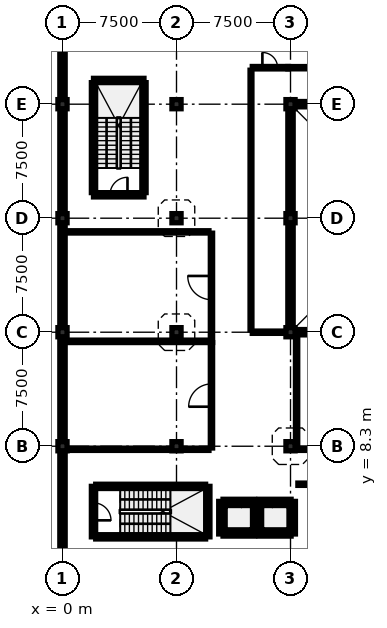
"""IFC4 building model, lengths in metres.
Left out: names, types, materials, properties, quantities, classifications, styles, units other than length and angle.
Written with IfcOpenShell. Run it as: python <this file> out.ifc"""

import sys

from ifc_helpers import new_model, si_unit, direction, frame, frame_2d, origin, origin_2d, place, context, subcontext, project, spatial, rectangle, extrude, element, fill, save


model = new_model("IFC4")
c1 = context("Model", 3, precision=1e-05, world=origin(), true_north=direction((0.0, 1.0)))
c2 = subcontext(c1, "Body", "Model", "MODEL_VIEW")
j1 = project(units=[si_unit("LENGTHUNIT", "METRE"), si_unit("PLANEANGLEUNIT", "RADIAN")], contexts=[c1])
p1 = place(None, origin())
s1 = spatial("IfcSite", under=j1, at=p1, CompositionType="ELEMENT")
p2 = place(p1, origin())
s2 = spatial("IfcBuilding", under=s1, at=p2, CompositionType="ELEMENT")
p3 = place(p2, frame((0.0, 0.0, 13.5)))
s3 = spatial("IfcBuildingStorey", under=s2, at=p3, CompositionType="ELEMENT", Elevation=13.5)
for number, where, z_axis, x_axis in (
    (1, (0.0, 8.3, 0.0), (0.0, 0.0, 1.0), (1.0, 0.0, 0.0)),
    (2, (0.0, 15.8, 0.0), (0.0, 0.0, 1.0), (1.0, 0.0, 0.0)),
    (3, (0.0, 23.3, 0.0), (0.0, 0.0, 1.0), (1.0, 0.0, 0.0)),
    (4, (0.0, 30.8, 0.0), (0.0, 0.0, 1.0), (1.0, 0.0, 0.0)),
    (5, (7.5, 8.3, 0.0), (0.0, 0.0, 1.0), (1.0, 0.0, 0.0)),
    (6, (7.5, 15.8, 0.0), (0.0, 0.0, 1.0), (1.0, 0.0, 0.0)),
    (7, (7.5, 23.3, 0.0), (0.0, 0.0, 1.0), (1.0, 0.0, 0.0)),
    (8, (7.5, 30.8, 0.0), (0.0, 0.0, 1.0), (1.0, 0.0, 0.0)),
    (9, (15.0, 8.3, 0.0), (0.0, 0.0, 1.0), (1.0, 0.0, 0.0)),
    (10, (15.0, 15.8, 0.0), (0.0, 0.0, 1.0), (1.0, 0.0, 0.0)),
    (11, (15.0, 23.3, 0.0), (0.0, 0.0, 1.0), (1.0, 0.0, 0.0)),
    (12, (15.0, 30.8, 0.0), (0.0, 0.0, 1.0), (1.0, 0.0, 0.0)),
):
    element("IfcColumn", number, at=place(p3, frame(where, z_axis=z_axis, x_axis=x_axis)), inside=s3, PredefinedType="COLUMN", context=c2, shape_type="SweptSolid", body=[
        extrude(rectangle(XDim=0.6, YDim=0.6, at=origin_2d()), origin(), (0.0, 0.0, 1.0), 3.72),
    ])
p4 = place(p3, frame((0.0, 1.1, 0.0), z_axis=(0.0, 0.0, 1.0), x_axis=(0.0, 1.0, 0.0)))
e13 = element("IfcWall", 13, at=p4, inside=s3, PredefinedType="SOLIDWALL", context=c2, shape_type="SweptSolid", body=[
    extrude(rectangle(XDim=6.9, YDim=0.35, at=frame_2d((3.45, 0.0))), origin(), (0.0, 0.0, 1.0), 3.005),
])
for number, where, z_axis, x_axis in (
    (14, (0.0, 8.6, 0.0), (0.0, 0.0, 1.0), (0.0, 1.0, 0.0)),
    (15, (0.0, 16.1, 0.0), (0.0, 0.0, 1.0), (0.0, 1.0, 0.0)),
    (16, (0.0, 23.6, 0.0), (0.0, 0.0, 1.0), (0.0, 1.0, 0.0)),
    (17, (0.0, 31.1, 0.0), (0.0, 0.0, 1.0), (0.0, 1.0, 0.0)),
    (18, (15.3, 15.8, 0.0), (0.0, 0.0, 1.0), (1.0, 0.0, 0.0)),
    (19, (22.2, 30.8, 0.0), (0.0, 0.0, 1.0), (-1.0, 0.0, 0.0)),
    (20, (15.0, 30.5, 0.0), (0.0, 0.0, 1.0), (0.0, -1.0, 0.0)),
    (21, (15.0, 23.0, 0.0), (0.0, 0.0, 1.0), (0.0, -1.0, 0.0)),
):
    element("IfcWall", number, at=place(p3, frame(where, z_axis=z_axis, x_axis=x_axis)), inside=s3, PredefinedType="SOLIDWALL", context=c2, shape_type="SweptSolid", body=[
        extrude(rectangle(XDim=6.9, YDim=0.35, at=frame_2d((3.45, 0.0))), origin(), (0.0, 0.0, 1.0), 2.805),
    ])
p5 = place(p3, frame((2.185, 2.34, 0.0), z_axis=(0.0, 0.0, 1.0), x_axis=(1.0, 0.0, 0.0)))
e22 = element("IfcWall", 22, at=p5, inside=s3, PredefinedType="SHEAR", context=c2, shape_type="SweptSolid", body=[
    extrude(rectangle(XDim=7.23, YDim=0.28, at=frame_2d((3.615, 0.0))), origin(), (0.0, 0.0, 1.0), 3.72),
])
p6 = place(p3, frame((9.56, 2.34, 0.0), z_axis=(0.0, 0.0, 1.0), x_axis=(0.0, 1.0, 0.0)))
e23 = element("IfcWall", 23, at=p6, inside=s3, PredefinedType="SHEAR", context=c2, shape_type="SweptSolid", body=[
    extrude(rectangle(XDim=3.32, YDim=0.28, at=frame_2d((1.66, 0.0))), origin(), (0.0, 0.0, 1.0), 3.72),
])
p7 = place(p3, frame((9.415, 5.66, 0.0), z_axis=(0.0, 0.0, 1.0), x_axis=(-1.0, 0.0, 0.0)))
e24 = element("IfcWall", 24, at=p7, inside=s3, PredefinedType="SHEAR", context=c2, shape_type="SweptSolid", body=[
    extrude(rectangle(XDim=7.23, YDim=0.28, at=frame_2d((3.615, 0.0))), origin(), (0.0, 0.0, 1.0), 3.72),
])
p8 = place(p3, frame((2.04, 5.66, 0.0), z_axis=(0.0, 0.0, 1.0), x_axis=(0.0, -1.0, 0.0)))
e25 = element("IfcWall", 25, at=p8, inside=s3, PredefinedType="SHEAR", context=c2, shape_type="SweptSolid", body=[
    extrude(rectangle(XDim=3.32, YDim=0.28, at=frame_2d((1.66, 0.0))), origin(), (0.0, 0.0, 1.0), 3.72),
])
p9 = place(p8, frame((1.085, 0.0, 0.0)))
e26 = element("IfcOpeningElement", 26, at=p9, cuts=e25, PredefinedType="OPENING", context=c2, shape_type="SweptSolid", body=[
    extrude(rectangle(XDim=1.15, YDim=2.15, at=frame_2d((0.575, 1.075))), frame((0.0, 0.152, 0.0), z_axis=(0.0, -1.0, 0.0), x_axis=(1.0, 0.0, 0.0)), (0.0, 0.0, 1.0), 0.304),
])
p10 = place(p3, frame((10.562, 2.529, 0.0), z_axis=(0.0, 0.0, 1.0), x_axis=(1.0, 0.0, 0.0)))
e27 = element("IfcWall", 27, at=p10, inside=s3, PredefinedType="SHEAR", context=c2, shape_type="SweptSolid", body=[
    extrude(rectangle(XDim=2.077, YDim=0.28, at=frame_2d((1.039, 0.0))), origin(), (0.0, 0.0, 1.0), 3.72),
])
p11 = place(p3, frame((12.783, 2.529, 0.0), z_axis=(0.0, 0.0, 1.0), x_axis=(0.0, 1.0, 0.0)))
e28 = element("IfcWall", 28, at=p11, inside=s3, PredefinedType="SHEAR", context=c2, shape_type="SweptSolid", body=[
    extrude(rectangle(XDim=2.141, YDim=0.28, at=frame_2d((1.071, 0.0))), origin(), (0.0, 0.0, 1.0), 3.72),
])
p12 = place(p3, frame((12.638, 4.671, 0.0), z_axis=(0.0, 0.0, 1.0), x_axis=(-1.0, 0.0, 0.0)))
e29 = element("IfcWall", 29, at=p12, inside=s3, PredefinedType="SHEAR", context=c2, shape_type="SweptSolid", body=[
    extrude(rectangle(XDim=2.077, YDim=0.28, at=frame_2d((1.039, 0.0))), origin(), (0.0, 0.0, 1.0), 3.72),
])
p13 = place(p12, frame((0.489, 0.0, 0.0)))
e30 = element("IfcOpeningElement", 30, at=p13, cuts=e29, PredefinedType="OPENING", context=c2, shape_type="SweptSolid", body=[
    extrude(rectangle(XDim=1.1, YDim=2.15, at=frame_2d((0.55, 1.075))), frame((0.0, 0.152, 0.0), z_axis=(0.0, -1.0, 0.0), x_axis=(1.0, 0.0, 0.0)), (0.0, 0.0, 1.0), 0.304),
])
p14 = place(p3, frame((10.417, 4.671, 0.0), z_axis=(0.0, 0.0, 1.0), x_axis=(0.0, -1.0, 0.0)))
e31 = element("IfcWall", 31, at=p14, inside=s3, PredefinedType="SHEAR", context=c2, shape_type="SweptSolid", body=[
    extrude(rectangle(XDim=2.141, YDim=0.28, at=frame_2d((1.071, 0.0))), origin(), (0.0, 0.0, 1.0), 3.72),
])
p15 = place(p3, frame((12.928, 2.529, 0.0), z_axis=(0.0, 0.0, 1.0), x_axis=(1.0, 0.0, 0.0)))
e32 = element("IfcWall", 32, at=p15, inside=s3, PredefinedType="SHEAR", context=c2, shape_type="SweptSolid", body=[
    extrude(rectangle(XDim=2.11, YDim=0.28, at=frame_2d((1.055, 0.0))), origin(), (0.0, 0.0, 1.0), 3.72),
])
p16 = place(p3, frame((15.184, 2.529, 0.0), z_axis=(0.0, 0.0, 1.0), x_axis=(0.0, 1.0, 0.0)))
e33 = element("IfcWall", 33, at=p16, inside=s3, PredefinedType="SHEAR", context=c2, shape_type="SweptSolid", body=[
    extrude(rectangle(XDim=2.141, YDim=0.28, at=frame_2d((1.071, 0.0))), origin(), (0.0, 0.0, 1.0), 3.72),
])
p17 = place(p3, frame((15.039, 4.671, 0.0), z_axis=(0.0, 0.0, 1.0), x_axis=(-1.0, 0.0, 0.0)))
e34 = element("IfcWall", 34, at=p17, inside=s3, PredefinedType="SHEAR", context=c2, shape_type="SweptSolid", body=[
    extrude(rectangle(XDim=2.11, YDim=0.28, at=frame_2d((1.055, 0.0))), origin(), (0.0, 0.0, 1.0), 3.72),
])
p18 = place(p17, frame((0.505, 0.0, 0.0)))
e35 = element("IfcOpeningElement", 35, at=p18, cuts=e34, PredefinedType="OPENING", context=c2, shape_type="SweptSolid", body=[
    extrude(rectangle(XDim=1.1, YDim=2.15, at=frame_2d((0.55, 1.075))), frame((0.0, 0.152, 0.0), z_axis=(0.0, -1.0, 0.0), x_axis=(1.0, 0.0, 0.0)), (0.0, 0.0, 1.0), 0.304),
])
p19 = place(p3, frame((5.36, 24.985, 0.0), z_axis=(0.0, 0.0, 1.0), x_axis=(0.0, 1.0, 0.0)))
e36 = element("IfcWall", 36, at=p19, inside=s3, PredefinedType="SHEAR", context=c2, shape_type="SweptSolid", body=[
    extrude(rectangle(XDim=7.23, YDim=0.28, at=frame_2d((3.615, 0.0))), origin(), (0.0, 0.0, 1.0), 3.72),
])
p20 = place(p3, frame((5.36, 32.36, 0.0), z_axis=(0.0, 0.0, 1.0), x_axis=(-1.0, 0.0, 0.0)))
e37 = element("IfcWall", 37, at=p20, inside=s3, PredefinedType="SHEAR", context=c2, shape_type="SweptSolid", body=[
    extrude(rectangle(XDim=3.32, YDim=0.28, at=frame_2d((1.66, 0.0))), origin(), (0.0, 0.0, 1.0), 3.72),
])
p21 = place(p3, frame((2.04, 32.215, 0.0), z_axis=(0.0, 0.0, 1.0), x_axis=(0.0, -1.0, 0.0)))
e38 = element("IfcWall", 38, at=p21, inside=s3, PredefinedType="SHEAR", context=c2, shape_type="SweptSolid", body=[
    extrude(rectangle(XDim=7.23, YDim=0.28, at=frame_2d((3.615, 0.0))), origin(), (0.0, 0.0, 1.0), 3.72),
])
p22 = place(p3, frame((2.04, 24.84, 0.0), z_axis=(0.0, 0.0, 1.0), x_axis=(1.0, 0.0, 0.0)))
e39 = element("IfcWall", 39, at=p22, inside=s3, PredefinedType="SHEAR", context=c2, shape_type="SweptSolid", body=[
    extrude(rectangle(XDim=3.32, YDim=0.28, at=frame_2d((1.66, 0.0))), origin(), (0.0, 0.0, 1.0), 3.72),
])
p23 = place(p22, frame((1.085, 0.0, 0.0)))
e40 = element("IfcOpeningElement", 40, at=p23, cuts=e39, PredefinedType="OPENING", context=c2, shape_type="SweptSolid", body=[
    extrude(rectangle(XDim=1.15, YDim=2.15, at=frame_2d((0.575, 1.075))), frame((0.0, 0.152, 0.0), z_axis=(0.0, -1.0, 0.0), x_axis=(1.0, 0.0, 0.0)), (0.0, 0.0, 1.0), 0.304),
])
p24 = place(p3, frame((15.485, 5.8, 0.0), z_axis=(0.0, 0.0, 1.0), x_axis=(1.0, 0.0, 0.0)))
e41 = element("IfcWall", 41, at=p24, inside=s3, PredefinedType="PARTITIONING", context=c2, shape_type="SweptSolid", body=[
    extrude(rectangle(XDim=7.23, YDim=0.15, at=frame_2d((3.615, 0.0))), origin(), (0.0, 0.0, 1.0), 2.805),
])
p25 = place(p24, frame((3.125, 0.0, 0.0)))
e42 = element("IfcOpeningElement", 42, at=p25, cuts=e41, PredefinedType="OPENING", context=c2, shape_type="SweptSolid", body=[
    extrude(rectangle(XDim=0.98, YDim=2.12, at=frame_2d((0.49, 1.06))), frame((0.0, 0.087, 0.0), z_axis=(0.0, -1.0, 0.0), x_axis=(1.0, 0.0, 0.0)), (0.0, 0.0, 1.0), 0.174),
])
p26 = place(p3, frame((15.312, 8.1, 0.0), z_axis=(0.0, 0.0, 1.0), x_axis=(1.0, 0.0, 0.0)))
e43 = element("IfcWall", 43, at=p26, inside=s3, PredefinedType="PARTITIONING", context=c2, shape_type="SweptSolid", body=[
    extrude(rectangle(XDim=11.013, YDim=0.15, at=frame_2d((5.506, 0.0))), origin(), (0.0, 0.0, 1.0), 2.805),
])
p27 = place(p26, frame((4.886, 0.0, 0.0)))
e44 = element("IfcOpeningElement", 44, at=p27, cuts=e43, PredefinedType="OPENING", context=c2, shape_type="SweptSolid", body=[
    extrude(rectangle(XDim=1.24, YDim=2.2, at=frame_2d((0.62, 1.1))), frame((0.0, 0.087, 0.0), z_axis=(0.0, -1.0, 0.0), x_axis=(1.0, 0.0, 0.0)), (0.0, 0.0, 1.0), 0.174),
])
p28 = place(p3, frame((9.8, 8.185, 0.0), z_axis=(0.0, 0.0, 1.0), x_axis=(0.0, 1.0, 0.0)))
e45 = element("IfcWall", 45, at=p28, inside=s3, PredefinedType="PARTITIONING", context=c2, shape_type="SweptSolid", body=[
    extrude(rectangle(XDim=6.93, YDim=0.15, at=frame_2d((3.465, 0.0))), origin(), (0.0, 0.0, 1.0), 2.805),
])
p29 = place(p28, frame((2.715, 0.0, 0.0)))
e46 = element("IfcOpeningElement", 46, at=p29, cuts=e45, PredefinedType="OPENING", context=c2, shape_type="SweptSolid", body=[
    extrude(rectangle(XDim=1.5, YDim=2.28, at=frame_2d((0.75, 1.14))), frame((0.0, 0.087, 0.0), z_axis=(0.0, -1.0, 0.0), x_axis=(1.0, 0.0, 0.0)), (0.0, 0.0, 1.0), 0.174),
])
p30 = place(p3, frame((9.8, 15.127, 0.0), z_axis=(0.0, 0.0, 1.0), x_axis=(0.0, 1.0, 0.0)))
e47 = element("IfcWall", 47, at=p30, inside=s3, PredefinedType="PARTITIONING", context=c2, shape_type="SweptSolid", body=[
    extrude(rectangle(XDim=7.188, YDim=0.15, at=frame_2d((3.594, 0.0))), origin(), (0.0, 0.0, 1.0), 2.805),
])
p31 = place(p30, frame((2.814, 0.0, 0.0)))
e48 = element("IfcOpeningElement", 48, at=p31, cuts=e47, PredefinedType="OPENING", context=c2, shape_type="SweptSolid", body=[
    extrude(rectangle(XDim=1.56, YDim=2.3, at=frame_2d((0.78, 1.15))), frame((0.0, 0.087, 0.0), z_axis=(0.0, -1.0, 0.0), x_axis=(1.0, 0.0, 0.0)), (0.0, 0.0, 1.0), 0.174),
])
p32 = place(p3, frame((12.485, 33.2, 0.0), z_axis=(0.0, 0.0, 1.0), x_axis=(1.0, 0.0, 0.0)))
e49 = element("IfcWall", 49, at=p32, inside=s3, PredefinedType="PARTITIONING", context=c2, shape_type="SweptSolid", body=[
    extrude(rectangle(XDim=2.33, YDim=0.16, at=frame_2d((1.165, 0.0))), origin(), (0.0, 0.0, 1.0), 2.805),
])
p33 = place(p32, frame((0.665, 0.0, 0.0)))
e50 = element("IfcOpeningElement", 50, at=p33, cuts=e49, PredefinedType="OPENING", context=c2, shape_type="SweptSolid", body=[
    extrude(rectangle(XDim=1.0, YDim=2.15, at=frame_2d((0.5, 1.075))), frame((0.0, 0.092, 0.0), z_axis=(0.0, -1.0, 0.0), x_axis=(1.0, 0.0, 0.0)), (0.0, 0.0, 1.0), 0.184),
])
p34 = place(p3, frame((14.827, 33.2, 0.0), z_axis=(0.0, 0.0, 1.0), x_axis=(1.0, 0.0, 0.0)))
e51 = element("IfcWall", 51, at=p34, inside=s3, PredefinedType="PARTITIONING", context=c2, shape_type="SweptSolid", body=[
    extrude(rectangle(XDim=7.488, YDim=0.15, at=frame_2d((3.744, 0.0))), origin(), (0.0, 0.0, 1.0), 2.805),
])
p35 = place(p34, frame((2.884, 0.0, 0.0)))
e52 = element("IfcOpeningElement", 52, at=p35, cuts=e51, PredefinedType="OPENING", context=c2, shape_type="SweptSolid", body=[
    extrude(rectangle(XDim=1.72, YDim=2.34, at=frame_2d((0.86, 1.17))), frame((0.0, 0.087, 0.0), z_axis=(0.0, -1.0, 0.0), x_axis=(1.0, 0.0, 0.0)), (0.0, 0.0, 1.0), 0.174),
])
p36 = place(p3, frame((12.485, 15.8, 0.0), z_axis=(0.0, 0.0, 1.0), x_axis=(1.0, 0.0, 0.0)))
e53 = element("IfcWall", 53, at=p36, inside=s3, PredefinedType="PARTITIONING", context=c2, shape_type="SweptSolid", body=[
    extrude(rectangle(XDim=2.203, YDim=0.15, at=frame_2d((1.102, 0.0))), origin(), (0.0, 0.0, 1.0), 2.805),
])
p37 = place(p3, frame((15.4, 8.187, 0.0), z_axis=(0.0, 0.0, 1.0), x_axis=(0.0, 1.0, 0.0)))
e54 = element("IfcWall", 54, at=p37, inside=s3, PredefinedType="PARTITIONING", context=c2, shape_type="SweptSolid", body=[
    extrude(rectangle(XDim=7.426, YDim=0.15, at=frame_2d((3.713, 0.0))), origin(), (0.0, 0.0, 1.0), 2.805),
])
p38 = place(p3, frame((0.312, 8.1, 0.0), z_axis=(0.0, 0.0, 1.0), x_axis=(1.0, 0.0, 0.0)))
e55 = element("IfcWall", 55, at=p38, inside=s3, PredefinedType="PARTITIONING", context=c2, shape_type="SweptSolid", body=[
    extrude(rectangle(XDim=9.323, YDim=0.15, at=frame_2d((4.662, 0.0))), origin(), (0.0, 0.0, 1.0), 2.805),
])
p39 = place(p3, frame((0.187, 15.2, 0.0), z_axis=(0.0, 0.0, 1.0), x_axis=(1.0, 0.0, 0.0)))
e56 = element("IfcWall", 56, at=p39, inside=s3, PredefinedType="PARTITIONING", context=c2, shape_type="SweptSolid", body=[
    extrude(rectangle(XDim=9.526, YDim=0.16, at=frame_2d((4.763, 0.0))), origin(), (0.0, 0.0, 1.0), 2.805),
])
p40 = place(p3, frame((0.187, 22.4, 0.0), z_axis=(0.0, 0.0, 1.0), x_axis=(1.0, 0.0, 0.0)))
e57 = element("IfcWall", 57, at=p40, inside=s3, PredefinedType="PARTITIONING", context=c2, shape_type="SweptSolid", body=[
    extrude(rectangle(XDim=9.448, YDim=0.15, at=frame_2d((4.724, 0.0))), origin(), (0.0, 0.0, 1.0), 2.805),
])
p41 = place(p3, frame((12.4, 15.965, 0.0), z_axis=(0.0, 0.0, 1.0), x_axis=(0.0, 1.0, 0.0)))
e58 = element("IfcWall", 58, at=p41, inside=s3, PredefinedType="PARTITIONING", context=c2, shape_type="SweptSolid", body=[
    extrude(rectangle(XDim=17.07, YDim=0.125, at=frame_2d((8.535, 0.0))), origin(), (0.0, 0.0, 1.0), 2.805),
])
p42 = place(p9, origin())
e59 = element("IfcDoor", 59, at=p42, inside=s3, OperationType="SINGLE_SWING_RIGHT", PredefinedType="DOOR", context=c2, shape_type="SweptSolid", body=[
    extrude(rectangle(XDim=1.15, YDim=2.15, at=frame_2d((0.575, 1.075))), frame((0.0, 0.025, 0.0), z_axis=(0.0, -1.0, 0.0), x_axis=(1.0, 0.0, 0.0)), (0.0, 0.0, 1.0), 0.05),
])
fill(e26, e59)
p43 = place(p13, origin())
e60 = element("IfcDoor", 60, at=p43, inside=s3, OperationType="SLIDING_TO_LEFT", PredefinedType="DOOR", context=c2, shape_type="SweptSolid", body=[
    extrude(rectangle(XDim=1.1, YDim=2.15, at=frame_2d((0.55, 1.075))), frame((0.0, 0.025, 0.0), z_axis=(0.0, -1.0, 0.0), x_axis=(1.0, 0.0, 0.0)), (0.0, 0.0, 1.0), 0.05),
])
fill(e30, e60)
p44 = place(p18, origin())
e61 = element("IfcDoor", 61, at=p44, inside=s3, OperationType="SLIDING_TO_RIGHT", PredefinedType="DOOR", context=c2, shape_type="SweptSolid", body=[
    extrude(rectangle(XDim=1.1, YDim=2.15, at=frame_2d((0.55, 1.075))), frame((0.0, 0.025, 0.0), z_axis=(0.0, -1.0, 0.0), x_axis=(1.0, 0.0, 0.0)), (0.0, 0.0, 1.0), 0.05),
])
fill(e35, e61)
p45 = place(p23, origin())
e62 = element("IfcDoor", 62, at=p45, inside=s3, OperationType="SINGLE_SWING_RIGHT", PredefinedType="DOOR", context=c2, shape_type="SweptSolid", body=[
    extrude(rectangle(XDim=1.15, YDim=2.15, at=frame_2d((0.575, 1.075))), frame((0.0, 0.025, 0.0), z_axis=(0.0, -1.0, 0.0), x_axis=(1.0, 0.0, 0.0)), (0.0, 0.0, 1.0), 0.05),
])
fill(e40, e62)
p46 = place(p29, origin())
e63 = element("IfcDoor", 63, at=p46, inside=s3, OperationType="SINGLE_SWING_LEFT", PredefinedType="DOOR", context=c2, shape_type="SweptSolid", body=[
    extrude(rectangle(XDim=1.5, YDim=2.28, at=frame_2d((0.75, 1.14))), frame((0.0, 0.025, 0.0), z_axis=(0.0, -1.0, 0.0), x_axis=(1.0, 0.0, 0.0)), (0.0, 0.0, 1.0), 0.05),
])
fill(e46, e63)
p47 = place(p31, origin())
e64 = element("IfcDoor", 64, at=p47, inside=s3, OperationType="SINGLE_SWING_RIGHT", PredefinedType="DOOR", context=c2, shape_type="SweptSolid", body=[
    extrude(rectangle(XDim=1.56, YDim=2.3, at=frame_2d((0.78, 1.15))), frame((0.0, 0.025, 0.0), z_axis=(0.0, -1.0, 0.0), x_axis=(1.0, 0.0, 0.0)), (0.0, 0.0, 1.0), 0.05),
])
fill(e48, e64)
p48 = place(p33, origin())
e65 = element("IfcDoor", 65, at=p48, inside=s3, OperationType="SINGLE_SWING_LEFT", PredefinedType="DOOR", context=c2, shape_type="SweptSolid", body=[
    extrude(rectangle(XDim=1.0, YDim=2.15, at=frame_2d((0.5, 1.075))), frame((0.0, 0.025, 0.0), z_axis=(0.0, -1.0, 0.0), x_axis=(1.0, 0.0, 0.0)), (0.0, 0.0, 1.0), 0.05),
])
fill(e50, e65)
save(model, sys.argv[1])
